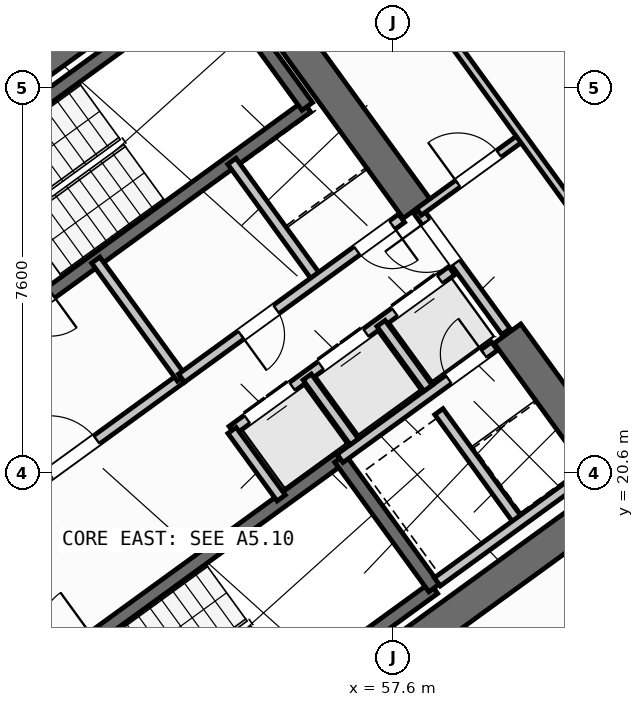
"""IFC4 building model, lengths in metres.
Left out: names, types, materials, properties, quantities, classifications, styles, units other than length and angle.
Written with IfcOpenShell. Run it as: python <this file> out.ifc"""

import sys

from ifc_helpers import new_model, si_unit, direction, frame, frame_2d, origin, place, context, subcontext, project, spatial, rectangle, extrude, source, transform, mapped, element, fill, save


model = new_model("IFC4")
c1 = context("Model", 3, precision=1e-05, world=origin(), true_north=direction((0.0, 1.0)))
c2 = subcontext(c1, "Body", "Model", "MODEL_VIEW")
j1 = project(units=[si_unit("LENGTHUNIT", "METRE"), si_unit("PLANEANGLEUNIT", "RADIAN")], contexts=[c1])
p1 = place(None, origin())
s1 = spatial("IfcSite", under=j1, at=p1, CompositionType="ELEMENT")
p2 = place(p1, origin())
s2 = spatial("IfcBuilding", under=s1, at=p2, CompositionType="ELEMENT")
p3 = place(p2, frame((0.0, 0.0, 45.6)))
s3 = spatial("IfcBuildingStorey", under=s2, at=p3, CompositionType="ELEMENT", Elevation=45.6)
p4 = place(p3, frame((52.318, 13.11, 0.0), z_axis=(0.0, 0.0, 1.0), x_axis=(0.809019445368, 0.587781878776, 0.0)))
e1 = element("IfcWall", 1, at=p4, inside=s3, PredefinedType="SHEAR", context=c2, shape_type="SweptSolid", body=[
    extrude(rectangle(XDim=12.44, YDim=0.65, at=frame_2d((6.22, 0.0))), origin(), (0.0, 0.0, 1.0), 3.35),
])
p5 = place(p3, frame((44.325, 24.113, 0.0), z_axis=(0.0, 0.0, 1.0), x_axis=(0.809012664862, 0.58779121131, 0.0)))
e2 = element("IfcWall", 2, at=p5, inside=s3, PredefinedType="SHEAR", context=c2, shape_type="SweptSolid", body=[
    extrude(rectangle(XDim=12.44, YDim=0.65, at=frame_2d((6.22, 0.0))), origin(), (0.0, 0.0, 1.0), 3.35),
])
p6 = place(p3, frame((61.929, 20.494, 0.0), z_axis=(0.0, 0.0, 1.0), x_axis=(-0.58782982593, 0.808984607855, 0.0)))
e3 = element("IfcWall", 3, at=p6, inside=s3, PredefinedType="SHEAR", context=c2, shape_type="SweptSolid", body=[
    extrude(rectangle(XDim=3.525, YDim=0.65, at=frame_2d((1.762, 0.0))), origin(), (0.0, 0.0, 1.0), 3.35),
])
p7 = place(p3, frame((58.064, 25.813, 0.0), z_axis=(0.0, 0.0, 1.0), x_axis=(-0.58777996584, 0.809020835181, 0.0)))
e4 = element("IfcWall", 4, at=p7, inside=s3, PredefinedType="SHEAR", context=c2, shape_type="SweptSolid", body=[
    extrude(rectangle(XDim=6.375, YDim=0.65, at=frame_2d((3.188, 0.0))), origin(), (0.0, 0.0, 1.0), 3.35),
])
p8 = place(p3, frame((43.938, 25.192, 0.0), z_axis=(0.0, 0.0, 1.0), x_axis=(0.809016324578, 0.587786174187, 0.0)))
e5 = element("IfcWall", 5, at=p8, inside=s3, PredefinedType="STANDARD", context=c2, shape_type="SweptSolid", body=[
    extrude(rectangle(XDim=17.587, YDim=0.32, at=frame_2d((8.794, 0.0))), origin(), (0.0, 0.0, 1.0), 3.35),
])
p9 = place(p8, frame((14.914, 0.0, 0.0)))
e6 = element("IfcOpeningElement", 6, at=p9, cuts=e5, PredefinedType="OPENING", context=c2, shape_type="SweptSolid", body=[
    extrude(rectangle(XDim=1.05, YDim=2.15, at=frame_2d((0.525, 1.075))), frame((0.0, 0.17, 0.0), z_axis=(0.0, -1.0, 0.0), x_axis=(1.0, 0.0, 0.0)), (0.0, 0.0, 1.0), 0.34),
])
p10 = place(p8, frame((2.169, 0.0, 0.8)))
e7 = element("IfcOpeningElement", 7, at=p10, cuts=e5, PredefinedType="OPENING", context=c2, shape_type="SweptSolid", body=[
    extrude(rectangle(XDim=2.1, YDim=1.55, at=frame_2d((1.05, 0.775))), frame((0.0, 0.17, 0.0), z_axis=(0.0, -1.0, 0.0), x_axis=(1.0, 0.0, 0.0)), (0.0, 0.0, 1.0), 0.34),
])
p11 = place(p8, frame((7.319, 0.0, 0.8)))
e8 = element("IfcOpeningElement", 8, at=p11, cuts=e5, PredefinedType="OPENING", context=c2, shape_type="SweptSolid", body=[
    extrude(rectangle(XDim=2.1, YDim=1.55, at=frame_2d((1.05, 0.775))), frame((0.0, 0.17, 0.0), z_axis=(0.0, -1.0, 0.0), x_axis=(1.0, 0.0, 0.0)), (0.0, 0.0, 1.0), 0.34),
])
p12 = place(p3, frame((58.455, 35.484, 0.0), z_axis=(0.0, 0.0, 1.0), x_axis=(0.587783625747, -0.809018176127, 0.0)))
e9 = element("IfcWall", 9, at=p12, inside=s3, PredefinedType="STANDARD", context=c2, shape_type="SweptSolid", body=[
    extrude(rectangle(XDim=21.587, YDim=0.32, at=frame_2d((10.794, 0.0))), origin(), (0.0, 0.0, 1.0), 2.725),
])
p13 = place(p12, frame((1.5, 0.0, 0.8)))
e10 = element("IfcOpeningElement", 10, at=p13, cuts=e9, PredefinedType="OPENING", context=c2, shape_type="SweptSolid", body=[
    extrude(rectangle(XDim=2.1, YDim=1.55, at=frame_2d((1.05, 0.775))), frame((0.0, 0.17, 0.0), z_axis=(0.0, -1.0, 0.0), x_axis=(1.0, 0.0, 0.0)), (0.0, 0.0, 1.0), 0.34),
])
p14 = place(p12, frame((5.105, 0.0, 0.85)))
e11 = element("IfcOpeningElement", 11, at=p14, cuts=e9, PredefinedType="OPENING", context=c2, shape_type="SweptSolid", body=[
    extrude(rectangle(XDim=1.5, YDim=1.5, at=frame_2d((0.75, 0.75))), frame((0.0, 0.17, 0.0), z_axis=(0.0, -1.0, 0.0), x_axis=(1.0, 0.0, 0.0)), (0.0, 0.0, 1.0), 0.34),
])
p15 = place(p12, frame((8.954, 0.0, 0.85)))
e12 = element("IfcOpeningElement", 12, at=p15, cuts=e9, PredefinedType="OPENING", context=c2, shape_type="SweptSolid", body=[
    extrude(rectangle(XDim=1.5, YDim=1.5, at=frame_2d((0.75, 0.75))), frame((0.0, 0.17, 0.0), z_axis=(0.0, -1.0, 0.0), x_axis=(1.0, 0.0, 0.0)), (0.0, 0.0, 1.0), 0.34),
])
p16 = place(p12, frame((17.581, 0.0, 0.95)))
e13 = element("IfcOpeningElement", 13, at=p16, cuts=e9, PredefinedType="OPENING", context=c2, shape_type="SweptSolid", body=[
    extrude(rectangle(XDim=1.2, YDim=1.4, at=frame_2d((0.6, 0.7))), frame((0.0, 0.17, 0.0), z_axis=(0.0, -1.0, 0.0), x_axis=(1.0, 0.0, 0.0)), (0.0, 0.0, 1.0), 0.34),
])
p17 = place(p3, frame((71.098, 17.731, 0.0), z_axis=(0.0, 0.0, 1.0), x_axis=(-0.809021120468, -0.587779573171, 0.0)))
e14 = element("IfcWall", 14, at=p17, inside=s3, PredefinedType="STANDARD", context=c2, shape_type="SweptSolid", body=[
    extrude(rectangle(XDim=17.588, YDim=0.32, at=frame_2d((8.794, 0.0))), origin(), (0.0, 0.0, 1.0), 3.35),
])
p18 = place(p17, frame((1.624, 0.0, 0.0)))
e15 = element("IfcOpeningElement", 15, at=p18, cuts=e14, PredefinedType="OPENING", context=c2, shape_type="SweptSolid", body=[
    extrude(rectangle(XDim=1.05, YDim=2.15, at=frame_2d((0.525, 1.075))), frame((0.0, 0.17, 0.0), z_axis=(0.0, -1.0, 0.0), x_axis=(1.0, 0.0, 0.0)), (0.0, 0.0, 1.0), 0.34),
])
p19 = place(p17, frame((4.104, 0.0, 1.0)))
e16 = element("IfcOpeningElement", 16, at=p19, cuts=e14, PredefinedType="OPENING", context=c2, shape_type="SweptSolid", body=[
    extrude(rectangle(XDim=0.9, YDim=1.25, at=frame_2d((0.45, 0.625))), frame((0.0, 0.17, 0.0), z_axis=(0.0, -1.0, 0.0), x_axis=(1.0, 0.0, 0.0)), (0.0, 0.0, 1.0), 0.34),
])
p20 = place(p17, frame((7.879, 0.0, 0.85)))
e17 = element("IfcOpeningElement", 17, at=p20, cuts=e14, PredefinedType="OPENING", context=c2, shape_type="SweptSolid", body=[
    extrude(rectangle(XDim=1.8, YDim=1.5, at=frame_2d((0.9, 0.75))), frame((0.0, 0.17, 0.0), z_axis=(0.0, -1.0, 0.0), x_axis=(1.0, 0.0, 0.0)), (0.0, 0.0, 1.0), 0.34),
])
p21 = place(p17, frame((12.849, 0.0, 0.85)))
e18 = element("IfcOpeningElement", 18, at=p21, cuts=e14, PredefinedType="OPENING", context=c2, shape_type="SweptSolid", body=[
    extrude(rectangle(XDim=1.8, YDim=1.5, at=frame_2d((0.9, 0.75))), frame((0.0, 0.17, 0.0), z_axis=(0.0, -1.0, 0.0), x_axis=(1.0, 0.0, 0.0)), (0.0, 0.0, 1.0), 0.34),
])
p22 = place(p3, frame((48.006, 25.996, 0.0), z_axis=(0.0, 0.0, 1.0), x_axis=(0.80901903764, 0.587782439969, 0.0)))
e19 = element("IfcWall", 19, at=p22, inside=s3, PredefinedType="SHEAR", context=c2, shape_type="SweptSolid", body=[
    extrude(rectangle(XDim=7.46, YDim=0.26, at=frame_2d((3.73, 0.0))), origin(), (0.0, 0.0, 1.0), 3.35),
])
p23 = place(p3, frame((49.863, 23.44, 0.0), z_axis=(0.0, 0.0, 1.0), x_axis=(0.809003474932, 0.587803859759, 0.0)))
e20 = element("IfcWall", 20, at=p23, inside=s3, PredefinedType="SHEAR", context=c2, shape_type="SweptSolid", body=[
    extrude(rectangle(XDim=7.46, YDim=0.26, at=frame_2d((3.73, 0.0))), origin(), (0.0, 0.0, 1.0), 3.35),
])
p24 = place(p23, frame((0.36, 0.0, 0.0)))
e21 = element("IfcOpeningElement", 21, at=p24, cuts=e20, PredefinedType="OPENING", context=c2, shape_type="SweptSolid", body=[
    extrude(rectangle(XDim=0.86, YDim=2.05, at=frame_2d((0.43, 1.025))), frame((0.0, 0.14, 0.0), z_axis=(0.0, -1.0, 0.0), x_axis=(1.0, 0.0, 0.0)), (0.0, 0.0, 1.0), 0.28),
])
p25 = place(p3, frame((55.906, 27.831, 0.0), z_axis=(0.0, 0.0, 1.0), x_axis=(-0.587804123638, 0.809003283204, 0.0)))
e22 = element("IfcWall", 22, at=p25, inside=s3, PredefinedType="SHEAR", context=c2, shape_type="SweptSolid", body=[
    extrude(rectangle(XDim=3.16, YDim=0.26, at=frame_2d((1.58, 0.0))), origin(), (0.0, 0.0, 1.0), 3.35),
])
p26 = place(p3, frame((52.472, 14.013, 0.0), z_axis=(0.0, 0.0, 1.0), x_axis=(0.809028366311, 0.587769599847, 0.0)))
e23 = element("IfcWall", 23, at=p26, inside=s3, PredefinedType="SHEAR", context=c2, shape_type="SweptSolid", body=[
    extrude(rectangle(XDim=7.33, YDim=0.26, at=frame_2d((3.665, 0.0))), origin(), (0.0, 0.0, 1.0), 3.35),
])
p27 = place(p3, frame((50.615, 16.57, 0.0), z_axis=(0.0, 0.0, 1.0), x_axis=(0.809028366311, 0.587769599847, 0.0)))
e24 = element("IfcWall", 24, at=p27, inside=s3, PredefinedType="SHEAR", context=c2, shape_type="SweptSolid", body=[
    extrude(rectangle(XDim=7.33, YDim=0.26, at=frame_2d((3.665, 0.0))), origin(), (0.0, 0.0, 1.0), 3.35),
])
p28 = place(p27, frame((0.22, 0.0, 0.0)))
e25 = element("IfcOpeningElement", 25, at=p28, cuts=e24, PredefinedType="OPENING", context=c2, shape_type="SweptSolid", body=[
    extrude(rectangle(XDim=1.1, YDim=2.1, at=frame_2d((0.55, 1.05))), frame((0.0, 0.14, 0.0), z_axis=(0.0, -1.0, 0.0), x_axis=(1.0, 0.0, 0.0)), (0.0, 0.0, 1.0), 0.28),
])
p29 = place(p3, frame((58.41, 18.327, 0.0), z_axis=(0.0, 0.0, 1.0), x_axis=(-0.58776738483, 0.809029975545, 0.0)))
e26 = element("IfcWall", 26, at=p29, inside=s3, PredefinedType="SHEAR", context=c2, shape_type="SweptSolid", body=[
    extrude(rectangle(XDim=3.16, YDim=0.26, at=frame_2d((1.58, 0.0))), origin(), (0.0, 0.0, 1.0), 3.35),
])
p30 = place(p3, frame((48.799, 19.107, 0.0), z_axis=(0.0, 0.0, 1.0), x_axis=(0.809012959416, 0.587790805897, 0.0)))
e27 = element("IfcWall", 27, at=p30, inside=s3, PredefinedType="STANDARD", context=c2, shape_type="SweptSolid", body=[
    extrude(rectangle(XDim=5.718, YDim=0.2, at=frame_2d((2.859, 0.0))), origin(), (0.0, 0.0, 1.0), 3.34),
])
p31 = place(p30, frame((2.498, 0.0, 0.0)))
e28 = element("IfcOpeningElement", 28, at=p31, cuts=e27, PredefinedType="OPENING", context=c2, shape_type="SweptSolid", body=[
    extrude(rectangle(XDim=1.15, YDim=2.1, at=frame_2d((0.575, 1.05))), frame((0.0, 0.11, 0.0), z_axis=(0.0, -1.0, 0.0), x_axis=(1.0, 0.0, 0.0)), (0.0, 0.0, 1.0), 0.22),
])
p32 = place(p3, frame((56.553, 20.884, 0.0), z_axis=(0.0, 0.0, 1.0), x_axis=(0.809035789462, 0.587759382205, 0.0)))
e29 = element("IfcWall", 29, at=p32, inside=s3, PredefinedType="STANDARD", context=c2, shape_type="SweptSolid", body=[
    extrude(rectangle(XDim=3.768, YDim=0.2, at=frame_2d((1.884, 0.0))), origin(), (0.0, 0.0, 1.0), 3.34),
])
p33 = place(p32, frame((2.65, 0.0, 0.0)))
e30 = element("IfcOpeningElement", 30, at=p33, cuts=e29, PredefinedType="OPENING", context=c2, shape_type="SweptSolid", body=[
    extrude(rectangle(XDim=0.86, YDim=2.05, at=frame_2d((0.43, 1.025))), frame((0.0, 0.11, 0.0), z_axis=(0.0, -1.0, 0.0), x_axis=(1.0, 0.0, 0.0)), (0.0, 0.0, 1.0), 0.22),
])
p34 = place(p3, frame((54.421, 21.436, 0.0), z_axis=(0.0, 0.0, 1.0), x_axis=(0.809013710463, 0.587789772183, 0.0)))
e31 = element("IfcWall", 31, at=p34, inside=s3, PredefinedType="STANDARD", context=c2, shape_type="SweptSolid", body=[
    extrude(rectangle(XDim=5.36, YDim=0.2, at=frame_2d((2.68, 0.0))), origin(), (0.0, 0.0, 1.0), 3.34),
])
p35 = place(p34, frame((0.37, 0.0, 0.0)))
e32 = element("IfcOpeningElement", 32, at=p35, cuts=e31, PredefinedType="OPENING", context=c2, shape_type="SweptSolid", body=[
    extrude(rectangle(XDim=1.1, YDim=2.15, at=frame_2d((0.55, 1.075))), frame((0.0, 0.11, 0.0), z_axis=(0.0, -1.0, 0.0), x_axis=(1.0, 0.0, 0.0)), (0.0, 0.0, 1.0), 0.22),
])
p36 = place(p34, frame((2.17, 0.0, 0.0)))
e33 = element("IfcOpeningElement", 33, at=p36, cuts=e31, PredefinedType="OPENING", context=c2, shape_type="SweptSolid", body=[
    extrude(rectangle(XDim=1.1, YDim=2.15, at=frame_2d((0.55, 1.075))), frame((0.0, 0.11, 0.0), z_axis=(0.0, -1.0, 0.0), x_axis=(1.0, 0.0, 0.0)), (0.0, 0.0, 1.0), 0.22),
])
p37 = place(p34, frame((3.97, 0.0, 0.0)))
e34 = element("IfcOpeningElement", 34, at=p37, cuts=e31, PredefinedType="OPENING", context=c2, shape_type="SweptSolid", body=[
    extrude(rectangle(XDim=1.1, YDim=2.15, at=frame_2d((0.55, 1.075))), frame((0.0, 0.11, 0.0), z_axis=(0.0, -1.0, 0.0), x_axis=(1.0, 0.0, 0.0)), (0.0, 0.0, 1.0), 0.22),
])
p38 = place(p3, frame((55.391, 20.102, 0.0), z_axis=(0.0, 0.0, 1.0), x_axis=(-0.58778447739, 0.809017557374, 0.0)))
e35 = element("IfcWall", 35, at=p38, inside=s3, PredefinedType="STANDARD", context=c2, shape_type="SweptSolid", body=[
    extrude(rectangle(XDim=1.65, YDim=0.2, at=frame_2d((0.825, 0.0))), origin(), (0.0, 0.0, 1.0), 3.34),
])
p39 = place(p3, frame((56.834, 21.212, 0.0), z_axis=(0.0, 0.0, 1.0), x_axis=(-0.58776738483, 0.809029975545, 0.0)))
e36 = element("IfcWall", 36, at=p39, inside=s3, PredefinedType="STANDARD", context=c2, shape_type="SweptSolid", body=[
    extrude(rectangle(XDim=1.58, YDim=0.2, at=frame_2d((0.79, 0.0))), origin(), (0.0, 0.0, 1.0), 3.34),
])
p40 = place(p3, frame((58.29, 22.27, 0.0), z_axis=(0.0, 0.0, 1.0), x_axis=(-0.587840865826, 0.808976585857, 0.0)))
e37 = element("IfcWall", 37, at=p40, inside=s3, PredefinedType="STANDARD", context=c2, shape_type="SweptSolid", body=[
    extrude(rectangle(XDim=1.58, YDim=0.2, at=frame_2d((0.79, 0.0))), origin(), (0.0, 0.0, 1.0), 3.34),
])
p41 = place(p3, frame((60.067, 19.655, 0.0), z_axis=(0.0, 0.0, 1.0), x_axis=(-0.587800520745, 0.809005900975, 0.0)))
e38 = element("IfcWall", 38, at=p41, inside=s3, PredefinedType="STANDARD", context=c2, shape_type="SweptSolid", body=[
    extrude(rectangle(XDim=2.66, YDim=0.2, at=frame_2d((1.33, 0.0))), origin(), (0.0, 0.0, 1.0), 3.34),
])
p42 = place(p3, frame((58.472, 18.447, 0.0), z_axis=(0.0, 0.0, 1.0), x_axis=(0.809022487728, 0.587777691266, 0.0)))
e39 = element("IfcWall", 39, at=p42, inside=s3, PredefinedType="STANDARD", context=c2, shape_type="SweptSolid", body=[
    extrude(rectangle(XDim=3.648, YDim=0.2, at=frame_2d((1.824, 0.0))), origin(), (0.0, 0.0, 1.0), 3.34),
])
p43 = place(p3, frame((53.425, 22.468, 0.0), z_axis=(0.0, 0.0, 1.0), x_axis=(-0.5877230039, 0.809062216821, 0.0)))
e40 = element("IfcWall", 40, at=p43, inside=s3, PredefinedType="STANDARD", context=c2, shape_type="SweptSolid", body=[
    extrude(rectangle(XDim=2.88, YDim=0.2, at=frame_2d((1.44, 0.0))), origin(), (0.0, 0.0, 1.0), 3.34),
])
p44 = place(p3, frame((56.111, 24.419, 0.0), z_axis=(0.0, 0.0, 1.0), x_axis=(-0.58777848983, 0.809021907548, 0.0)))
e41 = element("IfcWall", 41, at=p44, inside=s3, PredefinedType="STANDARD", context=c2, shape_type="SweptSolid", body=[
    extrude(rectangle(XDim=2.88, YDim=0.2, at=frame_2d((1.44, 0.0))), origin(), (0.0, 0.0, 1.0), 3.34),
])
p45 = place(p3, frame((53.425, 22.468, 0.0), z_axis=(0.0, 0.0, 1.0), x_axis=(0.80902705128, 0.587771409902, 0.0)))
e42 = element("IfcWall", 42, at=p45, inside=s3, PredefinedType="STANDARD", context=c2, shape_type="SweptSolid", body=[
    extrude(rectangle(XDim=5.368, YDim=0.2, at=frame_2d((2.684, 0.0))), origin(), (0.0, 0.0, 1.0), 3.34),
])
p46 = place(p45, frame((4.28, 0.0, 0.0)))
e43 = element("IfcOpeningElement", 43, at=p46, cuts=e42, PredefinedType="OPENING", context=c2, shape_type="SweptSolid", body=[
    extrude(rectangle(XDim=0.86, YDim=2.05, at=frame_2d((0.43, 1.025))), frame((0.0, 0.11, 0.0), z_axis=(0.0, -1.0, 0.0), x_axis=(1.0, 0.0, 0.0)), (0.0, 0.0, 1.0), 0.22),
])
p47 = place(p45, frame((1.45, 0.0, 0.0)))
e44 = element("IfcOpeningElement", 44, at=p47, cuts=e42, PredefinedType="OPENING", context=c2, shape_type="SweptSolid", body=[
    extrude(rectangle(XDim=0.86, YDim=2.05, at=frame_2d((0.43, 1.025))), frame((0.0, 0.11, 0.0), z_axis=(0.0, -1.0, 0.0), x_axis=(1.0, 0.0, 0.0)), (0.0, 0.0, 1.0), 0.22),
])
p48 = place(p3, frame((59.827, 23.386, 0.0), z_axis=(0.0, 0.0, 1.0), x_axis=(-0.587803840107, 0.809003489211, 0.0)))
e45 = element("IfcWall", 45, at=p48, inside=s3, PredefinedType="STANDARD", context=c2, shape_type="SweptSolid", body=[
    extrude(rectangle(XDim=2.96, YDim=0.2, at=frame_2d((1.48, 0.0))), origin(), (0.0, 0.0, 1.0), 3.34),
])
p49 = place(p48, frame((1.68, 0.0, 0.0)))
e46 = element("IfcOpeningElement", 46, at=p49, cuts=e45, PredefinedType="OPENING", context=c2, shape_type="SweptSolid", body=[
    extrude(rectangle(XDim=1.0, YDim=2.1, at=frame_2d((0.5, 1.05))), frame((0.0, 0.11, 0.0), z_axis=(0.0, -1.0, 0.0), x_axis=(1.0, 0.0, 0.0)), (0.0, 0.0, 1.0), 0.22),
])
p50 = place(p3, frame((58.111, 25.749, 0.0), z_axis=(0.0, 0.0, 1.0), x_axis=(0.809000999347, 0.58780726693, 0.0)))
e47 = element("IfcWall", 47, at=p50, inside=s3, PredefinedType="PARTITIONING", context=c2, shape_type="SweptSolid", body=[
    extrude(rectangle(XDim=2.51, YDim=0.16, at=frame_2d((1.255, 0.0))), origin(), (0.0, 0.0, 1.0), 2.725),
])
p51 = place(p50, frame((0.95, 0.0, 0.0)))
e48 = element("IfcOpeningElement", 48, at=p51, cuts=e47, PredefinedType="OPENING", context=c2, shape_type="SweptSolid", body=[
    extrude(rectangle(XDim=1.0, YDim=2.1, at=frame_2d((0.5, 1.05))), frame((0.0, 0.09, 0.0), z_axis=(0.0, -1.0, 0.0), x_axis=(1.0, 0.0, 0.0)), (0.0, 0.0, 1.0), 0.18),
])
p52 = place(p3, frame((62.328, 24.215, 0.0), z_axis=(0.0, 0.0, 1.0), x_axis=(-0.587778600963, 0.809021826807, 0.0)))
e49 = element("IfcWall", 49, at=p52, inside=s3, PredefinedType="PARTITIONING", context=c2, shape_type="SweptSolid", body=[
    extrude(rectangle(XDim=11.45, YDim=0.16, at=frame_2d((5.725, 0.0))), origin(), (0.0, 0.0, 1.0), 3.34),
])
p53 = place(p3, frame((53.705, 11.126, 0.0), z_axis=(0.0, 0.0, 1.0), x_axis=(0.809014504436, 0.587788679384, 0.0)))
e50 = element("IfcWall", 50, at=p53, inside=s3, PredefinedType="PARTITIONING", context=c2, shape_type="SweptSolid", body=[
    extrude(rectangle(XDim=14.67, YDim=0.16, at=frame_2d((7.335, 0.0))), origin(), (0.0, 0.0, 1.0), 3.34),
])
p54 = place(p53, frame((10.2, 0.0, 0.0)))
e51 = element("IfcOpeningElement", 51, at=p54, cuts=e50, PredefinedType="OPENING", context=c2, shape_type="SweptSolid", body=[
    extrude(rectangle(XDim=1.0, YDim=2.1, at=frame_2d((0.5, 1.05))), frame((0.0, 0.09, 0.0), z_axis=(0.0, -1.0, 0.0), x_axis=(1.0, 0.0, 0.0)), (0.0, 0.0, 1.0), 0.18),
])
p55 = place(p3, frame((56.249, 9.785, 0.0), z_axis=(0.0, 0.0, 1.0), x_axis=(0.809011747655, 0.587792473715, 0.0)))
e52 = element("IfcWall", 52, at=p55, inside=s3, PredefinedType="PLUMBINGWALL", context=c2, shape_type="SweptSolid", body=[
    extrude(rectangle(XDim=13.4, YDim=0.14, at=frame_2d((6.7, 0.0))), origin(), (0.0, 0.0, 1.0), 3.34),
])
p56 = place(p55, frame((8.94, 0.0, 0.0)))
e53 = element("IfcOpeningElement", 53, at=p56, cuts=e52, PredefinedType="OPENING", context=c2, shape_type="SweptSolid", body=[
    extrude(rectangle(XDim=0.92, YDim=2.08, at=frame_2d((0.46, 1.04))), frame((0.0, 0.08, 0.0), z_axis=(0.0, -1.0, 0.0), x_axis=(1.0, 0.0, 0.0)), (0.0, 0.0, 1.0), 0.16),
])
m1 = source(origin(), c2, "Body", "SweptSolid", [
    extrude(rectangle(XDim=1.15, YDim=2.1, at=frame_2d((0.575, 1.05))), frame((0.0, 0.025, 0.0), z_axis=(0.0, -1.0, 0.0), x_axis=(1.0, 0.0, 0.0)), (0.0, 0.0, 1.0), 0.05),
])
p57 = place(p31, origin())
e54 = element("IfcDoor", 54, at=p57, inside=s3, OperationType="SINGLE_SWING_LEFT", PredefinedType="DOOR", context=c2, shape_type="MappedRepresentation", body=[
    mapped(m1, transform((0.0, 0.0, 0.0), scale=1.0)),
])
fill(e28, e54)
m2 = source(origin(), c2, "Body", "SweptSolid", [
    extrude(rectangle(XDim=1.1, YDim=2.15, at=frame_2d((0.55, 1.075))), frame((0.0, 0.025, 0.0), z_axis=(0.0, -1.0, 0.0), x_axis=(1.0, 0.0, 0.0)), (0.0, 0.0, 1.0), 0.05),
])
p58 = place(p35, origin())
e55 = element("IfcDoor", 55, at=p58, inside=s3, OperationType="DOUBLE_DOOR_SLIDING", PredefinedType="DOOR", context=c2, shape_type="MappedRepresentation", body=[
    mapped(m2, transform((0.0, 0.0, 0.0), scale=1.0)),
])
fill(e32, e55)
p59 = place(p36, origin())
e56 = element("IfcDoor", 56, at=p59, inside=s3, OperationType="DOUBLE_DOOR_SLIDING", PredefinedType="DOOR", context=c2, shape_type="MappedRepresentation", body=[
    mapped(m2, transform((0.0, 0.0, 0.0), scale=1.0)),
])
fill(e33, e56)
p60 = place(p37, origin())
e57 = element("IfcDoor", 57, at=p60, inside=s3, OperationType="DOUBLE_DOOR_SLIDING", PredefinedType="DOOR", context=c2, shape_type="MappedRepresentation", body=[
    mapped(m2, transform((0.0, 0.0, 0.0), scale=1.0)),
])
fill(e34, e57)
m3 = source(origin(), c2, "Body", "SweptSolid", [
    extrude(rectangle(XDim=0.86, YDim=2.05, at=frame_2d((0.43, 1.025))), frame((0.0, 0.025, 0.0), z_axis=(0.0, -1.0, 0.0), x_axis=(1.0, 0.0, 0.0)), (0.0, 0.0, 1.0), 0.05),
])
p61 = place(p33, origin())
e58 = element("IfcDoor", 58, at=p61, inside=s3, OperationType="SINGLE_SWING_RIGHT", PredefinedType="DOOR", context=c2, shape_type="MappedRepresentation", body=[
    mapped(m3, transform((0.0, 0.0, 0.0), scale=1.0)),
])
fill(e30, e58)
p62 = place(p46, frame((0.86, 0.0, 0.0), z_axis=(0.0, 0.0, 1.0), x_axis=(-1.0, 0.0, 0.0)))
e59 = element("IfcDoor", 59, at=p62, inside=s3, OperationType="SINGLE_SWING_LEFT", PredefinedType="DOOR", context=c2, shape_type="MappedRepresentation", body=[
    mapped(m3, transform((0.0, 0.0, 0.0), scale=1.0)),
])
fill(e43, e59)
p63 = place(p47, frame((0.86, 0.0, 0.0), z_axis=(0.0, 0.0, 1.0), x_axis=(-1.0, 0.0, 0.0)))
e60 = element("IfcDoor", 60, at=p63, inside=s3, OperationType="SINGLE_SWING_RIGHT", PredefinedType="DOOR", context=c2, shape_type="MappedRepresentation", body=[
    mapped(m3, transform((0.0, 0.0, 0.0), scale=1.0)),
])
fill(e44, e60)
m4 = source(origin(), c2, "Body", "SweptSolid", [
    extrude(rectangle(XDim=1.0, YDim=2.1, at=frame_2d((0.5, 1.05))), frame((0.0, 0.025, 0.0), z_axis=(0.0, -1.0, 0.0), x_axis=(1.0, 0.0, 0.0)), (0.0, 0.0, 1.0), 0.05),
])
p64 = place(p51, origin())
e61 = element("IfcDoor", 61, at=p64, inside=s3, OperationType="SINGLE_SWING_LEFT", PredefinedType="DOOR", context=c2, shape_type="MappedRepresentation", body=[
    mapped(m4, transform((0.0, 0.0, 0.0), scale=1.0)),
])
fill(e48, e61)
p65 = place(p49, origin())
e62 = element("IfcDoor", 62, at=p65, inside=s3, OperationType="SINGLE_SWING_RIGHT", PredefinedType="DOOR", context=c2, shape_type="MappedRepresentation", body=[
    mapped(m4, transform((0.0, 0.0, 0.0), scale=1.0)),
])
fill(e46, e62)
save(model, sys.argv[1])
